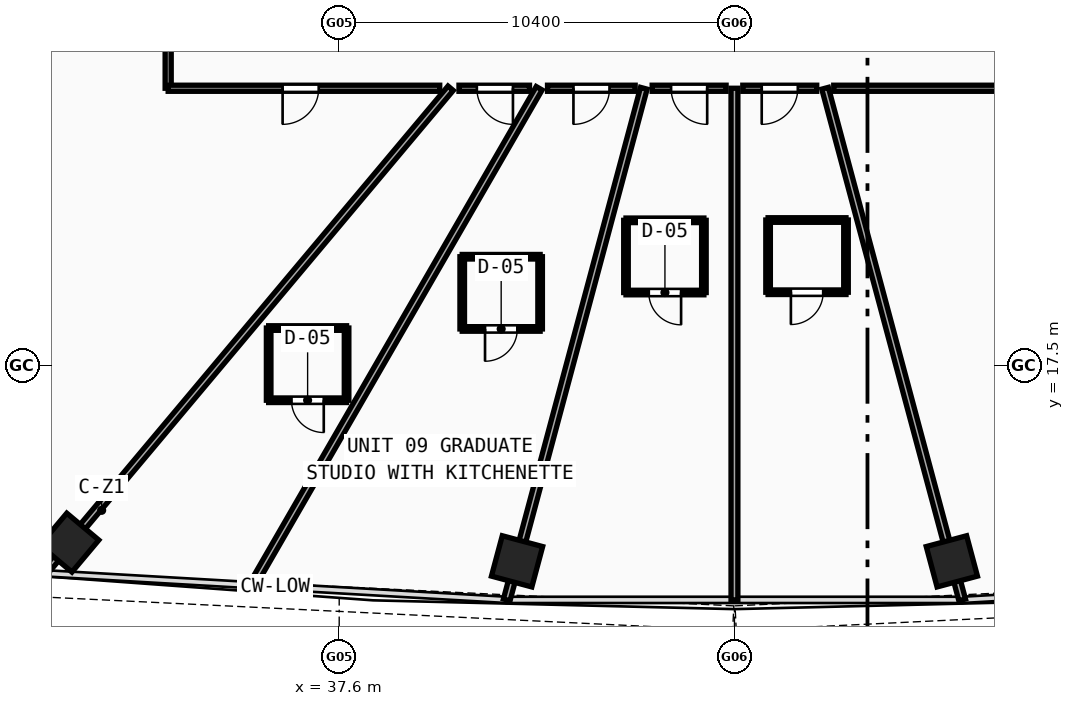
"""IFC4 building model, lengths in metres.
Left out: names, types, materials, properties, quantities, classifications, styles, units other than length and angle.
Written with IfcOpenShell. Run it as: python <this file> out.ifc"""

import sys

from ifc_helpers import new_model, si_unit, direction, frame, frame_2d, origin, origin_with_axes, origin_2d, place, context, subcontext, project, spatial, rectangle, hollow_rectangle, extrude, source, transform, mapped, element, fill, save


model = new_model("IFC4")
c1 = context("Model", 3, precision=1e-05, world=origin(), true_north=direction((0.0, 1.0)))
c2 = subcontext(c1, "Body", "Model", "MODEL_VIEW")
j1 = project(units=[si_unit("LENGTHUNIT", "METRE"), si_unit("PLANEANGLEUNIT", "RADIAN")], contexts=[c1])
p1 = place(None, origin())
s1 = spatial("IfcSite", under=j1, at=p1, CompositionType="ELEMENT")
p2 = place(p1, origin())
s2 = spatial("IfcBuilding", under=s1, at=p2, CompositionType="ELEMENT")
p3 = place(p2, frame((0.0, 0.0, 70.33)))
s3 = spatial("IfcBuildingStorey", under=s2, at=p3, CompositionType="ELEMENT", Elevation=70.33)
m1 = source(origin(), c2, "Body", "SweptSolid", [
    extrude(hollow_rectangle(XDim=1.1, YDim=1.1, WallThickness=0.045, at=origin_2d()), origin(), (0.0, 0.0, 1.0), 6.03),
])
for number, where, z_axis, x_axis in (
    (1, (30.5, 12.844, -0.26), (0.0, 0.0, 1.0), (0.766, -0.643, 0.0)),
    (2, (42.28, 12.352, -0.26), (0.0, 0.0, 1.0), (0.966, -0.259, 0.0)),
    (3, (53.72, 12.352, -0.26), (0.0, 0.0, 1.0), (0.966, 0.259, 0.0)),
):
    element("IfcColumn", number, at=place(p3, frame(where, z_axis=z_axis, x_axis=x_axis)), inside=s3, PredefinedType="COLUMN", context=c2, shape_type="MappedRepresentation", body=[
        mapped(m1, transform((0.0, 0.0, 0.0), scale=1.0)),
    ])
p4 = place(p3, frame((40.532, 24.8, 0.0), z_axis=(0.0, 0.0, 1.0), x_axis=(-0.642782945965, -0.766048356422, 0.0)))
e4 = element("IfcWall", 4, at=p4, inside=s3, PredefinedType="PARTITIONING", context=c2, shape_type="SweptSolid", body=[
    extrude(rectangle(XDim=16.657, YDim=0.18, at=frame_2d((8.329, 0.0))), origin(), (0.0, 0.0, 1.0), 2.42),
])
p5 = place(p3, frame((42.862, 24.8, 0.0), z_axis=(0.0, 0.0, 1.0), x_axis=(-0.499994448746, -0.866028608779, 0.0)))
e5 = element("IfcWall", 5, at=p5, inside=s3, PredefinedType="PARTITIONING", context=c2, shape_type="SweptSolid", body=[
    extrude(rectangle(XDim=15.099, YDim=0.18, at=frame_2d((7.55, 0.0))), origin(), (0.0, 0.0, 1.0), 5.07),
])
p6 = place(p3, frame((45.615, 24.8, 0.0), z_axis=(0.0, 0.0, 1.0), x_axis=(-0.258819267056, -0.965925766817, 0.0)))
e6 = element("IfcWall", 6, at=p6, inside=s3, PredefinedType="PARTITIONING", context=c2, shape_type="SweptSolid", body=[
    extrude(rectangle(XDim=13.937, YDim=0.18, at=frame_2d((6.969, 0.0))), origin(), (0.0, 0.0, 1.0), 2.42),
])
p7 = place(p3, frame((48.0, 24.8, 0.0), z_axis=(0.0, 0.0, 1.0), x_axis=(0.0, -1.0, 0.0)))
e7 = element("IfcWall", 7, at=p7, inside=s3, PredefinedType="PARTITIONING", context=c2, shape_type="SweptSolid", body=[
    extrude(rectangle(XDim=13.462, YDim=0.18, at=frame_2d((6.731, 0.0))), origin(), (0.0, 0.0, 1.0), 5.07),
])
p8 = place(p3, frame((50.385, 24.8, 0.0), z_axis=(0.0, 0.0, 1.0), x_axis=(0.258819267056, -0.965925766817, 0.0)))
e8 = element("IfcWall", 8, at=p8, inside=s3, PredefinedType="PARTITIONING", context=c2, shape_type="SweptSolid", body=[
    extrude(rectangle(XDim=13.937, YDim=0.18, at=frame_2d((6.969, 0.0))), origin(), (0.0, 0.0, 1.0), 2.42),
])
p9 = place(p3, frame((33.1, 24.8, 0.0), z_axis=(0.0, 0.0, 1.0), x_axis=(0.0, 1.0, 0.0)))
e9 = element("IfcWall", 9, at=p9, inside=s3, PredefinedType="PARTITIONING", context=c2, shape_type="SweptSolid", body=[
    extrude(rectangle(XDim=6.049, YDim=0.16, at=frame_2d((3.025, 0.0))), origin(), (0.0, 0.0, 1.0), 2.42),
])
p10 = place(p3, frame((63.55, 24.8, 0.0), z_axis=(0.0, 0.0, 1.0), x_axis=(-1.0, 0.0, 0.0)))
e10 = element("IfcWall", 10, at=p10, inside=s3, PredefinedType="PARTITIONING", context=c2, shape_type="SweptSolid", body=[
    extrude(rectangle(XDim=12.938, YDim=0.16, at=frame_2d((6.469, 0.0))), origin(), (0.0, 0.0, 1.0), 2.42),
])
p11 = place(p10, frame((5.878, 0.0, 0.0)))
e11 = element("IfcOpeningElement", 11, at=p11, cuts=e10, PredefinedType="OPENING", context=c2, shape_type="SweptSolid", body=[
    extrude(rectangle(XDim=0.95, YDim=2.1, at=frame_2d((0.475, 1.05))), frame((0.0, 0.09, 0.0), z_axis=(0.0, -1.0, 0.0), x_axis=(1.0, 0.0, 0.0)), (0.0, 0.0, 1.0), 0.18),
])
p12 = place(p3, frame((50.165, 24.8, 0.0), z_axis=(0.0, 0.0, 1.0), x_axis=(-1.0, 0.0, 0.0)))
e12 = element("IfcWall", 12, at=p12, inside=s3, PredefinedType="PARTITIONING", context=c2, shape_type="SweptSolid", body=[
    extrude(rectangle(XDim=1.945, YDim=0.16, at=frame_2d((0.972, 0.0))), origin(), (0.0, 0.0, 1.0), 2.42),
])
p13 = place(p12, frame((0.498, 0.0, 0.0)))
e13 = element("IfcOpeningElement", 13, at=p13, cuts=e12, PredefinedType="OPENING", context=c2, shape_type="SweptSolid", body=[
    extrude(rectangle(XDim=0.95, YDim=2.1, at=frame_2d((0.475, 1.05))), frame((0.0, 0.09, 0.0), z_axis=(0.0, -1.0, 0.0), x_axis=(1.0, 0.0, 0.0)), (0.0, 0.0, 1.0), 0.18),
])
p14 = place(p3, frame((47.78, 24.8, 0.0), z_axis=(0.0, 0.0, 1.0), x_axis=(-1.0, 0.0, 0.0)))
e14 = element("IfcWall", 14, at=p14, inside=s3, PredefinedType="PARTITIONING", context=c2, shape_type="SweptSolid", body=[
    extrude(rectangle(XDim=1.945, YDim=0.16, at=frame_2d((0.972, 0.0))), origin(), (0.0, 0.0, 1.0), 2.42),
])
p15 = place(p14, frame((0.497, 0.0, 0.0)))
e15 = element("IfcOpeningElement", 15, at=p15, cuts=e14, PredefinedType="OPENING", context=c2, shape_type="SweptSolid", body=[
    extrude(rectangle(XDim=0.95, YDim=2.1, at=frame_2d((0.475, 1.05))), frame((0.0, 0.09, 0.0), z_axis=(0.0, -1.0, 0.0), x_axis=(1.0, 0.0, 0.0)), (0.0, 0.0, 1.0), 0.18),
])
p16 = place(p3, frame((45.387, 24.8, 0.0), z_axis=(0.0, 0.0, 1.0), x_axis=(-1.0, 0.0, 0.0)))
e16 = element("IfcWall", 16, at=p16, inside=s3, PredefinedType="PARTITIONING", context=c2, shape_type="SweptSolid", body=[
    extrude(rectangle(XDim=2.306, YDim=0.16, at=frame_2d((1.153, 0.0))), origin(), (0.0, 0.0, 1.0), 2.42),
])
p17 = place(p16, frame((0.674, 0.0, 0.0)))
e17 = element("IfcOpeningElement", 17, at=p17, cuts=e16, PredefinedType="OPENING", context=c2, shape_type="SweptSolid", body=[
    extrude(rectangle(XDim=0.95, YDim=2.1, at=frame_2d((0.475, 1.05))), frame((0.0, 0.09, 0.0), z_axis=(0.0, -1.0, 0.0), x_axis=(1.0, 0.0, 0.0)), (0.0, 0.0, 1.0), 0.18),
])
p18 = place(p3, frame((42.608, 24.8, 0.0), z_axis=(0.0, 0.0, 1.0), x_axis=(-1.0, 0.0, 0.0)))
e18 = element("IfcWall", 18, at=p18, inside=s3, PredefinedType="PARTITIONING", context=c2, shape_type="SweptSolid", body=[
    extrude(rectangle(XDim=1.856, YDim=0.16, at=frame_2d((0.928, 0.0))), origin(), (0.0, 0.0, 1.0), 2.42),
])
p19 = place(p18, frame((0.436, 0.0, 0.0)))
e19 = element("IfcOpeningElement", 19, at=p19, cuts=e18, PredefinedType="OPENING", context=c2, shape_type="SweptSolid", body=[
    extrude(rectangle(XDim=0.95, YDim=2.1, at=frame_2d((0.475, 1.05))), frame((0.0, 0.09, 0.0), z_axis=(0.0, -1.0, 0.0), x_axis=(1.0, 0.0, 0.0)), (0.0, 0.0, 1.0), 0.18),
])
p20 = place(p3, frame((40.245, 24.8, 0.0), z_axis=(0.0, 0.0, 1.0), x_axis=(-1.0, 0.0, 0.0)))
e20 = element("IfcWall", 20, at=p20, inside=s3, PredefinedType="PARTITIONING", context=c2, shape_type="SweptSolid", body=[
    extrude(rectangle(XDim=7.145, YDim=0.16, at=frame_2d((3.572, 0.0))), origin(), (0.0, 0.0, 1.0), 2.42),
])
p21 = place(p20, frame((3.184, 0.0, 0.0)))
e21 = element("IfcOpeningElement", 21, at=p21, cuts=e20, PredefinedType="OPENING", context=c2, shape_type="SweptSolid", body=[
    extrude(rectangle(XDim=0.95, YDim=2.1, at=frame_2d((0.475, 1.05))), frame((0.0, 0.09, 0.0), z_axis=(0.0, -1.0, 0.0), x_axis=(1.0, 0.0, 0.0)), (0.0, 0.0, 1.0), 0.18),
])
p22 = place(p3, frame((35.744, 16.591, 0.0), z_axis=(0.0, 0.0, 1.0), x_axis=(1.0, 0.0, 0.0)))
e22 = element("IfcWall", 22, at=p22, inside=s3, PredefinedType="PARTITIONING", context=c2, shape_type="SweptSolid", body=[
    extrude(rectangle(XDim=2.05, YDim=0.12, at=frame_2d((1.025, 0.0))), origin(), (0.0, 0.0, 1.0), 5.77),
])
p23 = place(p22, frame((0.6, 0.0, 0.0)))
e23 = element("IfcOpeningElement", 23, at=p23, cuts=e22, PredefinedType="OPENING", context=c2, shape_type="SweptSolid", body=[
    extrude(rectangle(XDim=0.85, YDim=2.1, at=frame_2d((0.425, 1.05))), frame((0.0, 0.07, 0.0), z_axis=(0.0, -1.0, 0.0), x_axis=(1.0, 0.0, 0.0)), (0.0, 0.0, 1.0), 0.14),
])
p24 = place(p3, frame((37.794, 16.591, 0.0), z_axis=(0.0, 0.0, 1.0), x_axis=(0.0, 1.0, 0.0)))
e24 = element("IfcWall", 24, at=p24, inside=s3, PredefinedType="PARTITIONING", context=c2, shape_type="SweptSolid", body=[
    extrude(rectangle(XDim=1.9, YDim=0.12, at=frame_2d((0.95, 0.0))), origin(), (0.0, 0.0, 1.0), 5.37),
])
p25 = place(p3, frame((37.794, 18.491, 0.0), z_axis=(0.0, 0.0, 1.0), x_axis=(-1.0, 0.0, 0.0)))
e25 = element("IfcWall", 25, at=p25, inside=s3, PredefinedType="PARTITIONING", context=c2, shape_type="SweptSolid", body=[
    extrude(rectangle(XDim=2.05, YDim=0.12, at=frame_2d((1.025, 0.0))), origin(), (0.0, 0.0, 1.0), 2.42),
])
p26 = place(p3, frame((35.744, 18.491, 0.0), z_axis=(0.0, 0.0, 1.0), x_axis=(0.0, -1.0, 0.0)))
e26 = element("IfcWall", 26, at=p26, inside=s3, PredefinedType="PARTITIONING", context=c2, shape_type="SweptSolid", body=[
    extrude(rectangle(XDim=1.9, YDim=0.12, at=frame_2d((0.95, 0.0))), origin(), (0.0, 0.0, 1.0), 2.42),
])
p27 = place(p3, frame((40.837, 18.467, 0.0), z_axis=(0.0, 0.0, 1.0), x_axis=(1.0, 0.0, 0.0)))
e27 = element("IfcWall", 27, at=p27, inside=s3, PredefinedType="PARTITIONING", context=c2, shape_type="SweptSolid", body=[
    extrude(rectangle(XDim=2.05, YDim=0.12, at=frame_2d((1.025, 0.0))), origin(), (0.0, 0.0, 1.0), 5.77),
])
p28 = place(p27, frame((0.6, 0.0, 0.0)))
e28 = element("IfcOpeningElement", 28, at=p28, cuts=e27, PredefinedType="OPENING", context=c2, shape_type="SweptSolid", body=[
    extrude(rectangle(XDim=0.85, YDim=2.1, at=frame_2d((0.425, 1.05))), frame((0.0, 0.07, 0.0), z_axis=(0.0, -1.0, 0.0), x_axis=(1.0, 0.0, 0.0)), (0.0, 0.0, 1.0), 0.14),
])
p29 = place(p3, frame((42.887, 18.467, 0.0), z_axis=(0.0, 0.0, 1.0), x_axis=(0.0, 1.0, 0.0)))
e29 = element("IfcWall", 29, at=p29, inside=s3, PredefinedType="PARTITIONING", context=c2, shape_type="SweptSolid", body=[
    extrude(rectangle(XDim=1.9, YDim=0.12, at=frame_2d((0.95, 0.0))), origin(), (0.0, 0.0, 1.0), 5.77),
])
p30 = place(p3, frame((42.887, 20.367, 0.0), z_axis=(0.0, 0.0, 1.0), x_axis=(-1.0, 0.0, 0.0)))
e30 = element("IfcWall", 30, at=p30, inside=s3, PredefinedType="PARTITIONING", context=c2, shape_type="SweptSolid", body=[
    extrude(rectangle(XDim=2.05, YDim=0.12, at=frame_2d((1.025, 0.0))), origin(), (0.0, 0.0, 1.0), 5.77),
])
p31 = place(p3, frame((40.837, 20.367, 0.0), z_axis=(0.0, 0.0, 1.0), x_axis=(0.0, -1.0, 0.0)))
e31 = element("IfcWall", 31, at=p31, inside=s3, PredefinedType="PARTITIONING", context=c2, shape_type="SweptSolid", body=[
    extrude(rectangle(XDim=1.9, YDim=0.12, at=frame_2d((0.95, 0.0))), origin(), (0.0, 0.0, 1.0), 5.77),
])
p32 = place(p3, frame((45.146, 19.425, 0.0), z_axis=(0.0, 0.0, 1.0), x_axis=(1.0, 0.0, 0.0)))
e32 = element("IfcWall", 32, at=p32, inside=s3, PredefinedType="PARTITIONING", context=c2, shape_type="SweptSolid", body=[
    extrude(rectangle(XDim=2.05, YDim=0.12, at=frame_2d((1.025, 0.0))), origin(), (0.0, 0.0, 1.0), 5.77),
])
p33 = place(p32, frame((0.6, 0.0, 0.0)))
e33 = element("IfcOpeningElement", 33, at=p33, cuts=e32, PredefinedType="OPENING", context=c2, shape_type="SweptSolid", body=[
    extrude(rectangle(XDim=0.85, YDim=2.1, at=frame_2d((0.425, 1.05))), frame((0.0, 0.07, 0.0), z_axis=(0.0, -1.0, 0.0), x_axis=(1.0, 0.0, 0.0)), (0.0, 0.0, 1.0), 0.14),
])
p34 = place(p3, frame((47.196, 19.425, 0.0), z_axis=(0.0, 0.0, 1.0), x_axis=(0.0, 1.0, 0.0)))
e34 = element("IfcWall", 34, at=p34, inside=s3, PredefinedType="PARTITIONING", context=c2, shape_type="SweptSolid", body=[
    extrude(rectangle(XDim=1.9, YDim=0.12, at=frame_2d((0.95, 0.0))), origin(), (0.0, 0.0, 1.0), 5.77),
])
p35 = place(p3, frame((47.196, 21.325, 0.0), z_axis=(0.0, 0.0, 1.0), x_axis=(-1.0, 0.0, 0.0)))
e35 = element("IfcWall", 35, at=p35, inside=s3, PredefinedType="PARTITIONING", context=c2, shape_type="SweptSolid", body=[
    extrude(rectangle(XDim=2.05, YDim=0.12, at=frame_2d((1.025, 0.0))), origin(), (0.0, 0.0, 1.0), 2.42),
])
p36 = place(p3, frame((45.146, 21.325, 0.0), z_axis=(0.0, 0.0, 1.0), x_axis=(0.0, -1.0, 0.0)))
e36 = element("IfcWall", 36, at=p36, inside=s3, PredefinedType="PARTITIONING", context=c2, shape_type="SweptSolid", body=[
    extrude(rectangle(XDim=1.9, YDim=0.12, at=frame_2d((0.95, 0.0))), origin(), (0.0, 0.0, 1.0), 2.42),
])
p37 = place(p3, frame((48.885, 19.433, 0.0), z_axis=(0.0, 0.0, 1.0), x_axis=(1.0, 0.0, 0.0)))
e37 = element("IfcWall", 37, at=p37, inside=s3, PredefinedType="PARTITIONING", context=c2, shape_type="SweptSolid", body=[
    extrude(rectangle(XDim=2.05, YDim=0.12, at=frame_2d((1.025, 0.0))), origin(), (0.0, 0.0, 1.0), 5.77),
])
p38 = place(p37, frame((0.6, 0.0, 0.0)))
e38 = element("IfcOpeningElement", 38, at=p38, cuts=e37, PredefinedType="OPENING", context=c2, shape_type="SweptSolid", body=[
    extrude(rectangle(XDim=0.85, YDim=2.1, at=frame_2d((0.425, 1.05))), frame((0.0, 0.07, 0.0), z_axis=(0.0, -1.0, 0.0), x_axis=(1.0, 0.0, 0.0)), (0.0, 0.0, 1.0), 0.14),
])
p39 = place(p3, frame((50.935, 19.433, 0.0), z_axis=(0.0, 0.0, 1.0), x_axis=(0.0, 1.0, 0.0)))
e39 = element("IfcWall", 39, at=p39, inside=s3, PredefinedType="PARTITIONING", context=c2, shape_type="SweptSolid", body=[
    extrude(rectangle(XDim=1.9, YDim=0.12, at=frame_2d((0.95, 0.0))), origin(), (0.0, 0.0, 1.0), 2.42),
])
p40 = place(p3, frame((50.935, 21.333, 0.0), z_axis=(0.0, 0.0, 1.0), x_axis=(-1.0, 0.0, 0.0)))
e40 = element("IfcWall", 40, at=p40, inside=s3, PredefinedType="PARTITIONING", context=c2, shape_type="SweptSolid", body=[
    extrude(rectangle(XDim=2.05, YDim=0.12, at=frame_2d((1.025, 0.0))), origin(), (0.0, 0.0, 1.0), 2.42),
])
p41 = place(p3, frame((48.885, 21.333, 0.0), z_axis=(0.0, 0.0, 1.0), x_axis=(0.0, -1.0, 0.0)))
e41 = element("IfcWall", 41, at=p41, inside=s3, PredefinedType="PARTITIONING", context=c2, shape_type="SweptSolid", body=[
    extrude(rectangle(XDim=1.9, YDim=0.12, at=frame_2d((0.95, 0.0))), origin(), (0.0, 0.0, 1.0), 5.77),
])
m2 = source(origin(), c2, "Body", "SweptSolid", [
    extrude(rectangle(XDim=0.95, YDim=2.1, at=frame_2d((0.475, 1.05))), frame((0.0, 0.025, 0.0), z_axis=(0.0, -1.0, 0.0), x_axis=(1.0, 0.0, 0.0)), (0.0, 0.0, 1.0), 0.05),
])
p42 = place(p21, origin_with_axes())
e42 = element("IfcDoor", 42, at=p42, inside=s3, OperationType="SINGLE_SWING_RIGHT", PredefinedType="DOOR", context=c2, shape_type="MappedRepresentation", body=[
    mapped(m2, transform((0.0, 0.0, 0.0), scale=1.0)),
])
fill(e21, e42)
p43 = place(p19, origin_with_axes())
e43 = element("IfcDoor", 43, at=p43, inside=s3, OperationType="SINGLE_SWING_LEFT", PredefinedType="DOOR", context=c2, shape_type="MappedRepresentation", body=[
    mapped(m2, transform((0.0, 0.0, 0.0), scale=1.0)),
])
fill(e19, e43)
m3 = source(origin(), c2, "Body", "SweptSolid", [
    extrude(rectangle(XDim=0.85, YDim=2.1, at=frame_2d((0.425, 1.05))), frame((0.0, 0.025, 0.0), z_axis=(0.0, -1.0, 0.0), x_axis=(1.0, 0.0, 0.0)), (0.0, 0.0, 1.0), 0.05),
])
p44 = place(p23, frame((0.85, 0.0, 0.0), z_axis=(0.0, 0.0, 1.0), x_axis=(-1.0, 0.0, 0.0)))
e44 = element("IfcDoor", 44, at=p44, inside=s3, OperationType="SINGLE_SWING_LEFT", PredefinedType="DOOR", context=c2, shape_type="MappedRepresentation", body=[
    mapped(m3, transform((0.0, 0.0, 0.0), scale=1.0)),
])
fill(e23, e44)
p45 = place(p17, origin_with_axes())
e45 = element("IfcDoor", 45, at=p45, inside=s3, OperationType="SINGLE_SWING_RIGHT", PredefinedType="DOOR", context=c2, shape_type="MappedRepresentation", body=[
    mapped(m2, transform((0.0, 0.0, 0.0), scale=1.0)),
])
fill(e17, e45)
p46 = place(p28, frame((0.85, 0.0, 0.0), z_axis=(0.0, 0.0, 1.0), x_axis=(-1.0, 0.0, 0.0)))
e46 = element("IfcDoor", 46, at=p46, inside=s3, OperationType="SINGLE_SWING_RIGHT", PredefinedType="DOOR", context=c2, shape_type="MappedRepresentation", body=[
    mapped(m3, transform((0.0, 0.0, 0.0), scale=1.0)),
])
fill(e28, e46)
p47 = place(p15, origin_with_axes())
e47 = element("IfcDoor", 47, at=p47, inside=s3, OperationType="SINGLE_SWING_LEFT", PredefinedType="DOOR", context=c2, shape_type="MappedRepresentation", body=[
    mapped(m2, transform((0.0, 0.0, 0.0), scale=1.0)),
])
fill(e15, e47)
p48 = place(p33, frame((0.85, 0.0, 0.0), z_axis=(0.0, 0.0, 1.0), x_axis=(-1.0, 0.0, 0.0)))
e48 = element("IfcDoor", 48, at=p48, inside=s3, OperationType="SINGLE_SWING_LEFT", PredefinedType="DOOR", context=c2, shape_type="MappedRepresentation", body=[
    mapped(m3, transform((0.0, 0.0, 0.0), scale=1.0)),
])
fill(e33, e48)
p49 = place(p13, origin_with_axes())
e49 = element("IfcDoor", 49, at=p49, inside=s3, OperationType="SINGLE_SWING_RIGHT", PredefinedType="DOOR", context=c2, shape_type="MappedRepresentation", body=[
    mapped(m2, transform((0.0, 0.0, 0.0), scale=1.0)),
])
fill(e13, e49)
p50 = place(p38, frame((0.85, 0.0, 0.0), z_axis=(0.0, 0.0, 1.0), x_axis=(-1.0, 0.0, 0.0)))
e50 = element("IfcDoor", 50, at=p50, inside=s3, OperationType="SINGLE_SWING_RIGHT", PredefinedType="DOOR", context=c2, shape_type="MappedRepresentation", body=[
    mapped(m3, transform((0.0, 0.0, 0.0), scale=1.0)),
])
fill(e38, e50)
save(model, sys.argv[1])
